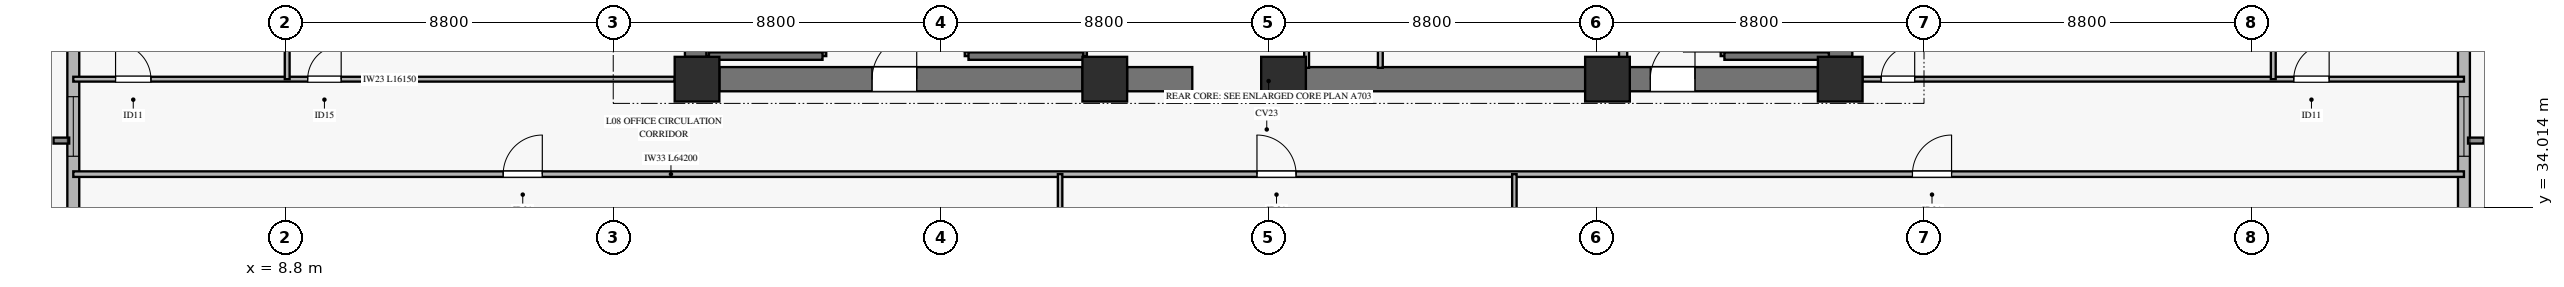
"""IFC4 building model, lengths in metres.
Left out: names, types, materials, properties, quantities, classifications, styles, units other than length and angle.
Written with IfcOpenShell. Run it as: python <this file> out.ifc"""

import sys

from ifc_helpers import new_model, si_unit, direction, frame, frame_2d, origin, origin_2d, place, context, subcontext, project, spatial, rectangle, extrude, source, transform, mapped, element, fill, save


model = new_model("IFC4")
c1 = context("Model", 3, precision=1e-05, world=origin(), true_north=direction((0.0, 1.0)))
c2 = subcontext(c1, "Body", "Model", "MODEL_VIEW")
j1 = project(units=[si_unit("LENGTHUNIT", "METRE"), si_unit("PLANEANGLEUNIT", "RADIAN")], contexts=[c1])
p1 = place(None, origin())
s1 = spatial("IfcSite", under=j1, at=p1, CompositionType="ELEMENT")
p2 = place(p1, origin())
s2 = spatial("IfcBuilding", under=s1, at=p2, CompositionType="ELEMENT")
p3 = place(p2, frame((0.0, 0.0, 33.2)))
s3 = spatial("IfcBuildingStorey", under=s2, at=p3, CompositionType="ELEMENT", Elevation=33.2)
m1 = source(origin(), c2, "Body", "SweptSolid", [
    extrude(rectangle(XDim=1.2, YDim=1.2, at=origin_2d()), origin(), (0.0, 0.0, 1.0), 3.68),
])
for number, where, z_axis, x_axis in (
    (1, (19.85, 37.45, 0.0), (0.0, 0.0, 1.0), (1.0, 0.0, 0.0)),
    (2, (30.8, 37.45, 0.0), (0.0, 0.0, 1.0), (1.0, 0.0, 0.0)),
    (3, (35.6, 37.45, 0.0), (0.0, 0.0, 1.0), (1.0, 0.0, 0.0)),
    (4, (44.3, 37.45, 0.0), (0.0, 0.0, 1.0), (1.0, 0.0, 0.0)),
    (5, (50.55, 37.45, 0.0), (0.0, 0.0, 1.0), (1.0, 0.0, 0.0)),
):
    element("IfcColumn", number, at=place(p3, frame(where, z_axis=z_axis, x_axis=x_axis)), inside=s3, PredefinedType="PILASTER", context=c2, shape_type="MappedRepresentation", body=[
        mapped(m1, transform((0.0, 0.0, 0.0), x_axis=(1.0, 0.0, 0.0), y_axis=(0.0, 1.0, 0.0), z_axis=(0.0, 0.0, 1.0), scale=1.0)),
    ])
p4 = place(p3, frame((20.45, 37.45, 0.0), z_axis=(0.0, 0.0, 1.0), x_axis=(1.0, 0.0, 0.0)))
e6 = element("IfcWall", 6, at=p4, inside=s3, PredefinedType="SHEAR", context=c2, shape_type="SweptSolid", body=[
    extrude(rectangle(XDim=9.75, YDim=0.65, at=frame_2d((4.875, 0.0))), origin(), (0.0, 0.0, 1.0), 3.68),
])
p5 = place(p4, frame((4.1, 0.0, 0.0)))
e7 = element("IfcOpeningElement", 7, at=p5, cuts=e6, PredefinedType="OPENING", context=c2, shape_type="SweptSolid", body=[
    extrude(rectangle(XDim=1.2, YDim=2.15, at=frame_2d((0.6, 1.075))), frame((0.0, 0.335, 0.0), z_axis=(0.0, -1.0, 0.0), x_axis=(1.0, 0.0, 0.0)), (0.0, 0.0, 1.0), 0.67),
])
p6 = place(p3, frame((31.4, 37.45, 0.0), z_axis=(0.0, 0.0, 1.0), x_axis=(1.0, 0.0, 0.0)))
e8 = element("IfcWall", 8, at=p6, inside=s3, PredefinedType="SHEAR", context=c2, shape_type="SweptSolid", body=[
    extrude(rectangle(XDim=1.75, YDim=0.65, at=frame_2d((0.875, 0.0))), origin(), (0.0, 0.0, 1.0), 3.68),
])
p7 = place(p3, frame((36.2, 37.45, 0.0), z_axis=(0.0, 0.0, 1.0), x_axis=(1.0, 0.0, 0.0)))
e9 = element("IfcWall", 9, at=p7, inside=s3, PredefinedType="SHEAR", context=c2, shape_type="SweptSolid", body=[
    extrude(rectangle(XDim=7.5, YDim=0.65, at=frame_2d((3.75, 0.0))), origin(), (0.0, 0.0, 1.0), 3.68),
])
p8 = place(p3, frame((44.9, 37.45, 0.0), z_axis=(0.0, 0.0, 1.0), x_axis=(1.0, 0.0, 0.0)))
e10 = element("IfcWall", 10, at=p8, inside=s3, PredefinedType="SHEAR", context=c2, shape_type="SweptSolid", body=[
    extrude(rectangle(XDim=5.05, YDim=0.65, at=frame_2d((2.525, 0.0))), origin(), (0.0, 0.0, 1.0), 3.68),
])
p9 = place(p8, frame((0.55, 0.0, 0.0)))
e11 = element("IfcOpeningElement", 11, at=p9, cuts=e10, PredefinedType="OPENING", context=c2, shape_type="SweptSolid", body=[
    extrude(rectangle(XDim=1.2, YDim=2.15, at=frame_2d((0.6, 1.075))), frame((0.0, 0.335, 0.0), z_axis=(0.0, -1.0, 0.0), x_axis=(1.0, 0.0, 0.0)), (0.0, 0.0, 1.0), 0.67),
])
for number, where, z_axis, x_axis in (
    (12, (19.85, 38.05, 0.0), (0.0, 0.0, 1.0), (0.0, 1.0, 0.0)),
    (13, (50.55, 38.05, 0.0), (0.0, 0.0, 1.0), (0.0, 1.0, 0.0)),
):
    element("IfcWall", number, at=place(p3, frame(where, z_axis=z_axis, x_axis=x_axis)), inside=s3, PredefinedType="SHEAR", context=c2, shape_type="SweptSolid", body=[
        extrude(rectangle(XDim=7.9, YDim=0.65, at=frame_2d((3.95, 0.0))), origin(), (0.0, 0.0, 1.0), 3.68),
    ])
p10 = place(p3, frame((3.1, 25.25, 0.0), z_axis=(0.0, 0.0, 1.0), x_axis=(0.0, 1.0, 0.0)))
e14 = element("IfcWall", 14, at=p10, inside=s3, PredefinedType="SOLIDWALL", context=c2, shape_type="SweptSolid", body=[
    extrude(rectangle(XDim=17.65, YDim=0.32, at=frame_2d((8.825, 0.0))), origin(), (0.0, 0.0, 1.0), 3.16),
])
p11 = place(p10, frame((10.13, 0.0, 0.45)))
e15 = element("IfcOpeningElement", 15, at=p11, cuts=e14, PredefinedType="OPENING", context=c2, shape_type="SweptSolid", body=[
    extrude(rectangle(XDim=1.6, YDim=2.0, at=frame_2d((0.8, 1.0))), frame((0.0, 0.17, 0.0), z_axis=(0.0, -1.0, 0.0), x_axis=(1.0, 0.0, 0.0)), (0.0, 0.0, 1.0), 0.34),
])
p12 = place(p3, frame((67.3, 25.25, 0.0), z_axis=(0.0, 0.0, 1.0), x_axis=(0.0, 1.0, 0.0)))
e16 = element("IfcWall", 16, at=p12, inside=s3, PredefinedType="SOLIDWALL", context=c2, shape_type="SweptSolid", body=[
    extrude(rectangle(XDim=17.65, YDim=0.32, at=frame_2d((8.825, 0.0))), origin(), (0.0, 0.0, 1.0), 3.16),
])
p13 = place(p12, frame((10.13, 0.0, 0.45)))
e17 = element("IfcOpeningElement", 17, at=p13, cuts=e16, PredefinedType="OPENING", context=c2, shape_type="SweptSolid", body=[
    extrude(rectangle(XDim=1.6, YDim=2.0, at=frame_2d((0.8, 1.0))), frame((0.0, 0.17, 0.0), z_axis=(0.0, -1.0, 0.0), x_axis=(1.0, 0.0, 0.0)), (0.0, 0.0, 1.0), 0.34),
])
p14 = place(p3, frame((20.17, 38.07, 0.0), z_axis=(0.0, 0.0, 1.0), x_axis=(0.0, 1.0, 0.0)))
e18 = element("IfcWall", 18, at=p14, inside=s3, PredefinedType="SOLIDWALL", context=c2, shape_type="SweptSolid", body=[
    extrude(rectangle(XDim=7.25, YDim=0.14, at=frame_2d((3.625, 0.0))), origin(), (0.0, 0.0, 1.0), 3.9),
])
p15 = place(p3, frame((23.22, 38.07, 0.0), z_axis=(0.0, 0.0, 1.0), x_axis=(0.0, 1.0, 0.0)))
e19 = element("IfcWall", 19, at=p15, inside=s3, PredefinedType="SOLIDWALL", context=c2, shape_type="SweptSolid", body=[
    extrude(rectangle(XDim=7.25, YDim=0.2, at=frame_2d((3.625, 0.0))), origin(), (0.0, 0.0, 1.0), 3.9),
])
p16 = place(p15, frame((0.11, 0.0, 0.0)))
e20 = element("IfcOpeningElement", 20, at=p16, cuts=e19, PredefinedType="OPENING", context=c2, shape_type="SweptSolid", body=[
    extrude(rectangle(XDim=1.1, YDim=2.15, at=frame_2d((0.55, 1.075))), frame((0.0, 0.11, 0.0), z_axis=(0.0, -1.0, 0.0), x_axis=(1.0, 0.0, 0.0)), (0.0, 0.0, 1.0), 0.22),
])
p17 = place(p3, frame((20.17, 38.07, 0.0), z_axis=(0.0, 0.0, 1.0), x_axis=(1.0, 0.0, 0.0)))
e21 = element("IfcWall", 21, at=p17, inside=s3, PredefinedType="SOLIDWALL", context=c2, shape_type="SweptSolid", body=[
    extrude(rectangle(XDim=3.05, YDim=0.2, at=frame_2d((1.525, 0.0))), origin(), (0.0, 0.0, 1.0), 3.9),
])
p18 = place(p3, frame((27.14, 38.07, 0.0), z_axis=(0.0, 0.0, 1.0), x_axis=(0.0, 1.0, 0.0)))
e22 = element("IfcWall", 22, at=p18, inside=s3, PredefinedType="SOLIDWALL", context=c2, shape_type="SweptSolid", body=[
    extrude(rectangle(XDim=7.25, YDim=0.2, at=frame_2d((3.625, 0.0))), origin(), (0.0, 0.0, 1.0), 3.9),
])
p19 = place(p18, frame((0.11, 0.0, 0.0)))
e23 = element("IfcOpeningElement", 23, at=p19, cuts=e22, PredefinedType="OPENING", context=c2, shape_type="SweptSolid", body=[
    extrude(rectangle(XDim=1.1, YDim=2.15, at=frame_2d((0.55, 1.075))), frame((0.0, 0.11, 0.0), z_axis=(0.0, -1.0, 0.0), x_axis=(1.0, 0.0, 0.0)), (0.0, 0.0, 1.0), 0.22),
])
p20 = place(p3, frame((30.22, 38.07, 0.0), z_axis=(0.0, 0.0, 1.0), x_axis=(0.0, 1.0, 0.0)))
e24 = element("IfcWall", 24, at=p20, inside=s3, PredefinedType="SOLIDWALL", context=c2, shape_type="SweptSolid", body=[
    extrude(rectangle(XDim=7.25, YDim=0.2, at=frame_2d((3.625, 0.0))), origin(), (0.0, 0.0, 1.0), 3.9),
])
p21 = place(p3, frame((27.14, 38.07, 0.0), z_axis=(0.0, 0.0, 1.0), x_axis=(1.0, 0.0, 0.0)))
e25 = element("IfcWall", 25, at=p21, inside=s3, PredefinedType="SOLIDWALL", context=c2, shape_type="SweptSolid", body=[
    extrude(rectangle(XDim=3.08, YDim=0.2, at=frame_2d((1.54, 0.0))), origin(), (0.0, 0.0, 1.0), 3.9),
])
p22 = place(p3, frame((47.44, 38.07, 0.0), z_axis=(0.0, 0.0, 1.0), x_axis=(0.0, 1.0, 0.0)))
e26 = element("IfcWall", 26, at=p22, inside=s3, PredefinedType="SOLIDWALL", context=c2, shape_type="SweptSolid", body=[
    extrude(rectangle(XDim=7.25, YDim=0.2, at=frame_2d((3.625, 0.0))), origin(), (0.0, 0.0, 1.0), 3.9),
])
p23 = place(p22, frame((0.11, 0.0, 0.0)))
e27 = element("IfcOpeningElement", 27, at=p23, cuts=e26, PredefinedType="OPENING", context=c2, shape_type="SweptSolid", body=[
    extrude(rectangle(XDim=1.1, YDim=2.15, at=frame_2d((0.55, 1.075))), frame((0.0, 0.11, 0.0), z_axis=(0.0, -1.0, 0.0), x_axis=(1.0, 0.0, 0.0)), (0.0, 0.0, 1.0), 0.22),
])
p24 = place(p3, frame((47.44, 38.07, 0.0), z_axis=(0.0, 0.0, 1.0), x_axis=(1.0, 0.0, 0.0)))
e28 = element("IfcWall", 28, at=p24, inside=s3, PredefinedType="SOLIDWALL", context=c2, shape_type="SweptSolid", body=[
    extrude(rectangle(XDim=2.805, YDim=0.2, at=frame_2d((1.403, 0.0))), origin(), (0.0, 0.0, 1.0), 3.9),
])
p25 = place(p3, frame((44.72, 37.755, 0.0), z_axis=(0.0, 0.0, 1.0), x_axis=(0.0, 1.0, 0.0)))
e29 = element("IfcWall", 29, at=p25, inside=s3, PredefinedType="SOLIDWALL", context=c2, shape_type="SweptSolid", body=[
    extrude(rectangle(XDim=7.465, YDim=0.22, at=frame_2d((3.732, 0.0))), origin(), (0.0, 0.0, 1.0), 3.68),
])
p26 = place(p3, frame((36.22, 37.755, 0.0), z_axis=(0.0, 0.0, 1.0), x_axis=(0.0, 1.0, 0.0)))
e30 = element("IfcWall", 30, at=p26, inside=s3, PredefinedType="PARTITIONING", context=c2, shape_type="SweptSolid", body=[
    extrude(rectangle(XDim=2.165, YDim=0.13, at=frame_2d((1.083, 0.0))), origin(), (0.0, 0.0, 1.0), 3.68),
])
p27 = place(p26, frame((0.855, 0.0, 0.0)))
e31 = element("IfcOpeningElement", 31, at=p27, cuts=e30, PredefinedType="OPENING", context=c2, shape_type="SweptSolid", body=[
    extrude(rectangle(XDim=0.9, YDim=2.1, at=frame_2d((0.45, 1.05))), frame((0.0, 0.075, 0.0), z_axis=(0.0, -1.0, 0.0), x_axis=(1.0, 0.0, 0.0)), (0.0, 0.0, 1.0), 0.15),
])
p28 = place(p3, frame((38.2, 37.755, 0.0), z_axis=(0.0, 0.0, 1.0), x_axis=(0.0, 1.0, 0.0)))
e32 = element("IfcWall", 32, at=p28, inside=s3, PredefinedType="PARTITIONING", context=c2, shape_type="SweptSolid", body=[
    extrude(rectangle(XDim=2.165, YDim=0.13, at=frame_2d((1.083, 0.0))), origin(), (0.0, 0.0, 1.0), 3.68),
])
p29 = place(p28, frame((0.565, 0.0, 0.0)))
e33 = element("IfcOpeningElement", 33, at=p29, cuts=e32, PredefinedType="OPENING", context=c2, shape_type="SweptSolid", body=[
    extrude(rectangle(XDim=0.9, YDim=2.1, at=frame_2d((0.45, 1.05))), frame((0.0, 0.075, 0.0), z_axis=(0.0, -1.0, 0.0), x_axis=(1.0, 0.0, 0.0)), (0.0, 0.0, 1.0), 0.15),
])
p30 = place(p3, frame((3.1, 34.9, 0.0), z_axis=(0.0, 0.0, 1.0), x_axis=(1.0, 0.0, 0.0)))
e34 = element("IfcWall", 34, at=p30, inside=s3, PredefinedType="PARTITIONING", context=c2, shape_type="SweptSolid", body=[
    extrude(rectangle(XDim=64.2, YDim=0.15, at=frame_2d((32.1, 0.0))), origin(), (0.0, 0.0, 1.0), 2.765),
])
p31 = place(p30, frame((11.545, 0.0, 0.0)))
e35 = element("IfcOpeningElement", 35, at=p31, cuts=e34, PredefinedType="OPENING", context=c2, shape_type="SweptSolid", body=[
    extrude(rectangle(XDim=1.05, YDim=2.15, at=frame_2d((0.525, 1.075))), frame((0.0, 0.085, 0.0), z_axis=(0.0, -1.0, 0.0), x_axis=(1.0, 0.0, 0.0)), (0.0, 0.0, 1.0), 0.17),
])
p32 = place(p30, frame((31.787, 0.0, 0.0)))
e36 = element("IfcOpeningElement", 36, at=p32, cuts=e34, PredefinedType="OPENING", context=c2, shape_type="SweptSolid", body=[
    extrude(rectangle(XDim=1.05, YDim=2.15, at=frame_2d((0.525, 1.075))), frame((0.0, 0.085, 0.0), z_axis=(0.0, -1.0, 0.0), x_axis=(1.0, 0.0, 0.0)), (0.0, 0.0, 1.0), 0.17),
])
p33 = place(p30, frame((49.39, 0.0, 0.0)))
e37 = element("IfcOpeningElement", 37, at=p33, cuts=e34, PredefinedType="OPENING", context=c2, shape_type="SweptSolid", body=[
    extrude(rectangle(XDim=1.05, YDim=2.15, at=frame_2d((0.525, 1.075))), frame((0.0, 0.085, 0.0), z_axis=(0.0, -1.0, 0.0), x_axis=(1.0, 0.0, 0.0)), (0.0, 0.0, 1.0), 0.17),
])
for number, where, z_axis, x_axis in (
    (38, (29.6, 3.3, 0.0), (0.0, 0.0, 1.0), (0.0, 1.0, 0.0)),
    (39, (41.8, 3.3, 0.0), (0.0, 0.0, 1.0), (0.0, 1.0, 0.0)),
):
    element("IfcWall", number, at=place(p3, frame(where, z_axis=z_axis, x_axis=x_axis)), inside=s3, PredefinedType="PARTITIONING", context=c2, shape_type="SweptSolid", body=[
        extrude(rectangle(XDim=31.6, YDim=0.12, at=frame_2d((15.8, 0.0))), origin(), (0.0, 0.0, 1.0), 3.165),
    ])
p34 = place(p3, frame((3.1, 37.45, 0.0), z_axis=(0.0, 0.0, 1.0), x_axis=(1.0, 0.0, 0.0)))
e40 = element("IfcWall", 40, at=p34, inside=s3, PredefinedType="PARTITIONING", context=c2, shape_type="SweptSolid", body=[
    extrude(rectangle(XDim=16.15, YDim=0.13, at=frame_2d((8.075, 0.0))), origin(), (0.0, 0.0, 1.0), 3.165),
])
p35 = place(p34, frame((1.135, 0.0, 0.0)))
e41 = element("IfcOpeningElement", 41, at=p35, cuts=e40, PredefinedType="OPENING", context=c2, shape_type="SweptSolid", body=[
    extrude(rectangle(XDim=0.95, YDim=2.1, at=frame_2d((0.475, 1.05))), frame((0.0, 0.075, 0.0), z_axis=(0.0, -1.0, 0.0), x_axis=(1.0, 0.0, 0.0)), (0.0, 0.0, 1.0), 0.15),
])
p36 = place(p34, frame((6.294, 0.0, 0.0)))
e42 = element("IfcOpeningElement", 42, at=p36, cuts=e40, PredefinedType="OPENING", context=c2, shape_type="SweptSolid", body=[
    extrude(rectangle(XDim=0.9, YDim=2.1, at=frame_2d((0.45, 1.05))), frame((0.0, 0.075, 0.0), z_axis=(0.0, -1.0, 0.0), x_axis=(1.0, 0.0, 0.0)), (0.0, 0.0, 1.0), 0.15),
])
p37 = place(p3, frame((8.844, 37.45, 0.0), z_axis=(0.0, 0.0, 1.0), x_axis=(0.0, 1.0, 0.0)))
e43 = element("IfcWall", 43, at=p37, inside=s3, PredefinedType="PARTITIONING", context=c2, shape_type="SweptSolid", body=[
    extrude(rectangle(XDim=8.8, YDim=0.13, at=frame_2d((4.4, 0.0))), origin(), (0.0, 0.0, 1.0), 3.68),
])
p38 = place(p3, frame((51.15, 37.45, 0.0), z_axis=(0.0, 0.0, 1.0), x_axis=(1.0, 0.0, 0.0)))
e44 = element("IfcWall", 44, at=p38, inside=s3, PredefinedType="PARTITIONING", context=c2, shape_type="SweptSolid", body=[
    extrude(rectangle(XDim=16.15, YDim=0.13, at=frame_2d((8.075, 0.0))), origin(), (0.0, 0.0, 1.0), 3.165),
])
p39 = place(p38, frame((0.5, 0.0, 0.0)))
e45 = element("IfcOpeningElement", 45, at=p39, cuts=e44, PredefinedType="OPENING", context=c2, shape_type="SweptSolid", body=[
    extrude(rectangle(XDim=0.9, YDim=2.1, at=frame_2d((0.45, 1.05))), frame((0.0, 0.075, 0.0), z_axis=(0.0, -1.0, 0.0), x_axis=(1.0, 0.0, 0.0)), (0.0, 0.0, 1.0), 0.15),
])
p40 = place(p38, frame((11.58, 0.0, 0.0)))
e46 = element("IfcOpeningElement", 46, at=p40, cuts=e44, PredefinedType="OPENING", context=c2, shape_type="SweptSolid", body=[
    extrude(rectangle(XDim=0.95, YDim=2.1, at=frame_2d((0.475, 1.05))), frame((0.0, 0.075, 0.0), z_axis=(0.0, -1.0, 0.0), x_axis=(1.0, 0.0, 0.0)), (0.0, 0.0, 1.0), 0.15),
])
p41 = place(p3, frame((62.18, 37.45, 0.0), z_axis=(0.0, 0.0, 1.0), x_axis=(0.0, 1.0, 0.0)))
e47 = element("IfcWall", 47, at=p41, inside=s3, PredefinedType="PARTITIONING", context=c2, shape_type="SweptSolid", body=[
    extrude(rectangle(XDim=8.8, YDim=0.13, at=frame_2d((4.4, 0.0))), origin(), (0.0, 0.0, 1.0), 3.68),
])
m2 = source(origin(), c2, "Body", "SweptSolid", [
    extrude(rectangle(XDim=1.6, YDim=2.0, at=frame_2d((0.8, 1.0))), frame((0.0, 0.03, 0.0), z_axis=(0.0, -1.0, 0.0), x_axis=(1.0, 0.0, 0.0)), (0.0, 0.0, 1.0), 0.06),
])
p42 = place(p11, origin())
e48 = element("IfcWindow", 48, at=p42, inside=s3, PartitioningType="SINGLE_PANEL", PredefinedType="WINDOW", context=c2, shape_type="MappedRepresentation", body=[
    mapped(m2, transform((0.0, 0.0, 0.0), x_axis=(1.0, 0.0, 0.0), y_axis=(0.0, 1.0, 0.0), z_axis=(0.0, 0.0, 1.0), scale=1.0)),
])
fill(e15, e48)
p43 = place(p13, origin())
e49 = element("IfcWindow", 49, at=p43, inside=s3, PartitioningType="SINGLE_PANEL", PredefinedType="WINDOW", context=c2, shape_type="MappedRepresentation", body=[
    mapped(m2, transform((0.0, 0.0, 0.0), x_axis=(1.0, 0.0, 0.0), y_axis=(0.0, 1.0, 0.0), z_axis=(0.0, 0.0, 1.0), scale=1.0)),
])
fill(e17, e49)
m3 = source(origin(), c2, "Body", "SweptSolid", [
    extrude(rectangle(XDim=1.2, YDim=2.15, at=frame_2d((0.6, 1.075))), frame((0.0, 0.025, 0.0), z_axis=(0.0, -1.0, 0.0), x_axis=(1.0, 0.0, 0.0)), (0.0, 0.0, 1.0), 0.05),
])
p44 = place(p5, origin())
e50 = element("IfcDoor", 50, at=p44, inside=s3, OperationType="SINGLE_SWING_RIGHT", PredefinedType="DOOR", context=c2, shape_type="MappedRepresentation", body=[
    mapped(m3, transform((0.0, 0.0, 0.0), x_axis=(1.0, 0.0, 0.0), y_axis=(0.0, 1.0, 0.0), z_axis=(0.0, 0.0, 1.0), scale=1.0)),
])
fill(e7, e50)
p45 = place(p9, origin())
e51 = element("IfcDoor", 51, at=p45, inside=s3, OperationType="SINGLE_SWING_RIGHT", PredefinedType="DOOR", context=c2, shape_type="MappedRepresentation", body=[
    mapped(m3, transform((0.0, 0.0, 0.0), x_axis=(1.0, 0.0, 0.0), y_axis=(0.0, 1.0, 0.0), z_axis=(0.0, 0.0, 1.0), scale=1.0)),
])
fill(e11, e51)
m4 = source(origin(), c2, "Body", "SweptSolid", [
    extrude(rectangle(XDim=1.05, YDim=2.15, at=frame_2d((0.525, 1.075))), frame((0.0, 0.025, 0.0), z_axis=(0.0, -1.0, 0.0), x_axis=(1.0, 0.0, 0.0)), (0.0, 0.0, 1.0), 0.05),
])
p46 = place(p31, origin())
e52 = element("IfcDoor", 52, at=p46, inside=s3, OperationType="SINGLE_SWING_RIGHT", PredefinedType="DOOR", context=c2, shape_type="MappedRepresentation", body=[
    mapped(m4, transform((0.0, 0.0, 0.0), x_axis=(1.0, 0.0, 0.0), y_axis=(0.0, 1.0, 0.0), z_axis=(0.0, 0.0, 1.0), scale=1.0)),
])
fill(e35, e52)
p47 = place(p32, origin())
e53 = element("IfcDoor", 53, at=p47, inside=s3, OperationType="SINGLE_SWING_LEFT", PredefinedType="DOOR", context=c2, shape_type="MappedRepresentation", body=[
    mapped(m4, transform((0.0, 0.0, 0.0), x_axis=(1.0, 0.0, 0.0), y_axis=(0.0, 1.0, 0.0), z_axis=(0.0, 0.0, 1.0), scale=1.0)),
])
fill(e36, e53)
p48 = place(p33, origin())
e54 = element("IfcDoor", 54, at=p48, inside=s3, OperationType="SINGLE_SWING_RIGHT", PredefinedType="DOOR", context=c2, shape_type="MappedRepresentation", body=[
    mapped(m4, transform((0.0, 0.0, 0.0), x_axis=(1.0, 0.0, 0.0), y_axis=(0.0, 1.0, 0.0), z_axis=(0.0, 0.0, 1.0), scale=1.0)),
])
fill(e37, e54)
m5 = source(origin(), c2, "Body", "SweptSolid", [
    extrude(rectangle(XDim=0.95, YDim=2.1, at=frame_2d((0.475, 1.05))), frame((0.0, 0.025, 0.0), z_axis=(0.0, -1.0, 0.0), x_axis=(1.0, 0.0, 0.0)), (0.0, 0.0, 1.0), 0.05),
])
p49 = place(p35, origin())
e55 = element("IfcDoor", 55, at=p49, inside=s3, OperationType="SINGLE_SWING_LEFT", PredefinedType="DOOR", context=c2, shape_type="MappedRepresentation", body=[
    mapped(m5, transform((0.0, 0.0, 0.0), x_axis=(1.0, 0.0, 0.0), y_axis=(0.0, 1.0, 0.0), z_axis=(0.0, 0.0, 1.0), scale=1.0)),
])
fill(e41, e55)
m6 = source(origin(), c2, "Body", "SweptSolid", [
    extrude(rectangle(XDim=0.9, YDim=2.1, at=frame_2d((0.45, 1.05))), frame((0.0, 0.025, 0.0), z_axis=(0.0, -1.0, 0.0), x_axis=(1.0, 0.0, 0.0)), (0.0, 0.0, 1.0), 0.05),
])
p50 = place(p36, origin())
e56 = element("IfcDoor", 56, at=p50, inside=s3, OperationType="SINGLE_SWING_RIGHT", PredefinedType="DOOR", context=c2, shape_type="MappedRepresentation", body=[
    mapped(m6, transform((0.0, 0.0, 0.0), x_axis=(1.0, 0.0, 0.0), y_axis=(0.0, 1.0, 0.0), z_axis=(0.0, 0.0, 1.0), scale=1.0)),
])
fill(e42, e56)
p51 = place(p39, origin())
e57 = element("IfcDoor", 57, at=p51, inside=s3, OperationType="SINGLE_SWING_RIGHT", PredefinedType="DOOR", context=c2, shape_type="MappedRepresentation", body=[
    mapped(m6, transform((0.0, 0.0, 0.0), x_axis=(1.0, 0.0, 0.0), y_axis=(0.0, 1.0, 0.0), z_axis=(0.0, 0.0, 1.0), scale=1.0)),
])
fill(e45, e57)
p52 = place(p40, origin())
e58 = element("IfcDoor", 58, at=p52, inside=s3, OperationType="SINGLE_SWING_RIGHT", PredefinedType="DOOR", context=c2, shape_type="MappedRepresentation", body=[
    mapped(m5, transform((0.0, 0.0, 0.0), x_axis=(1.0, 0.0, 0.0), y_axis=(0.0, 1.0, 0.0), z_axis=(0.0, 0.0, 1.0), scale=1.0)),
])
fill(e46, e58)
save(model, sys.argv[1])
